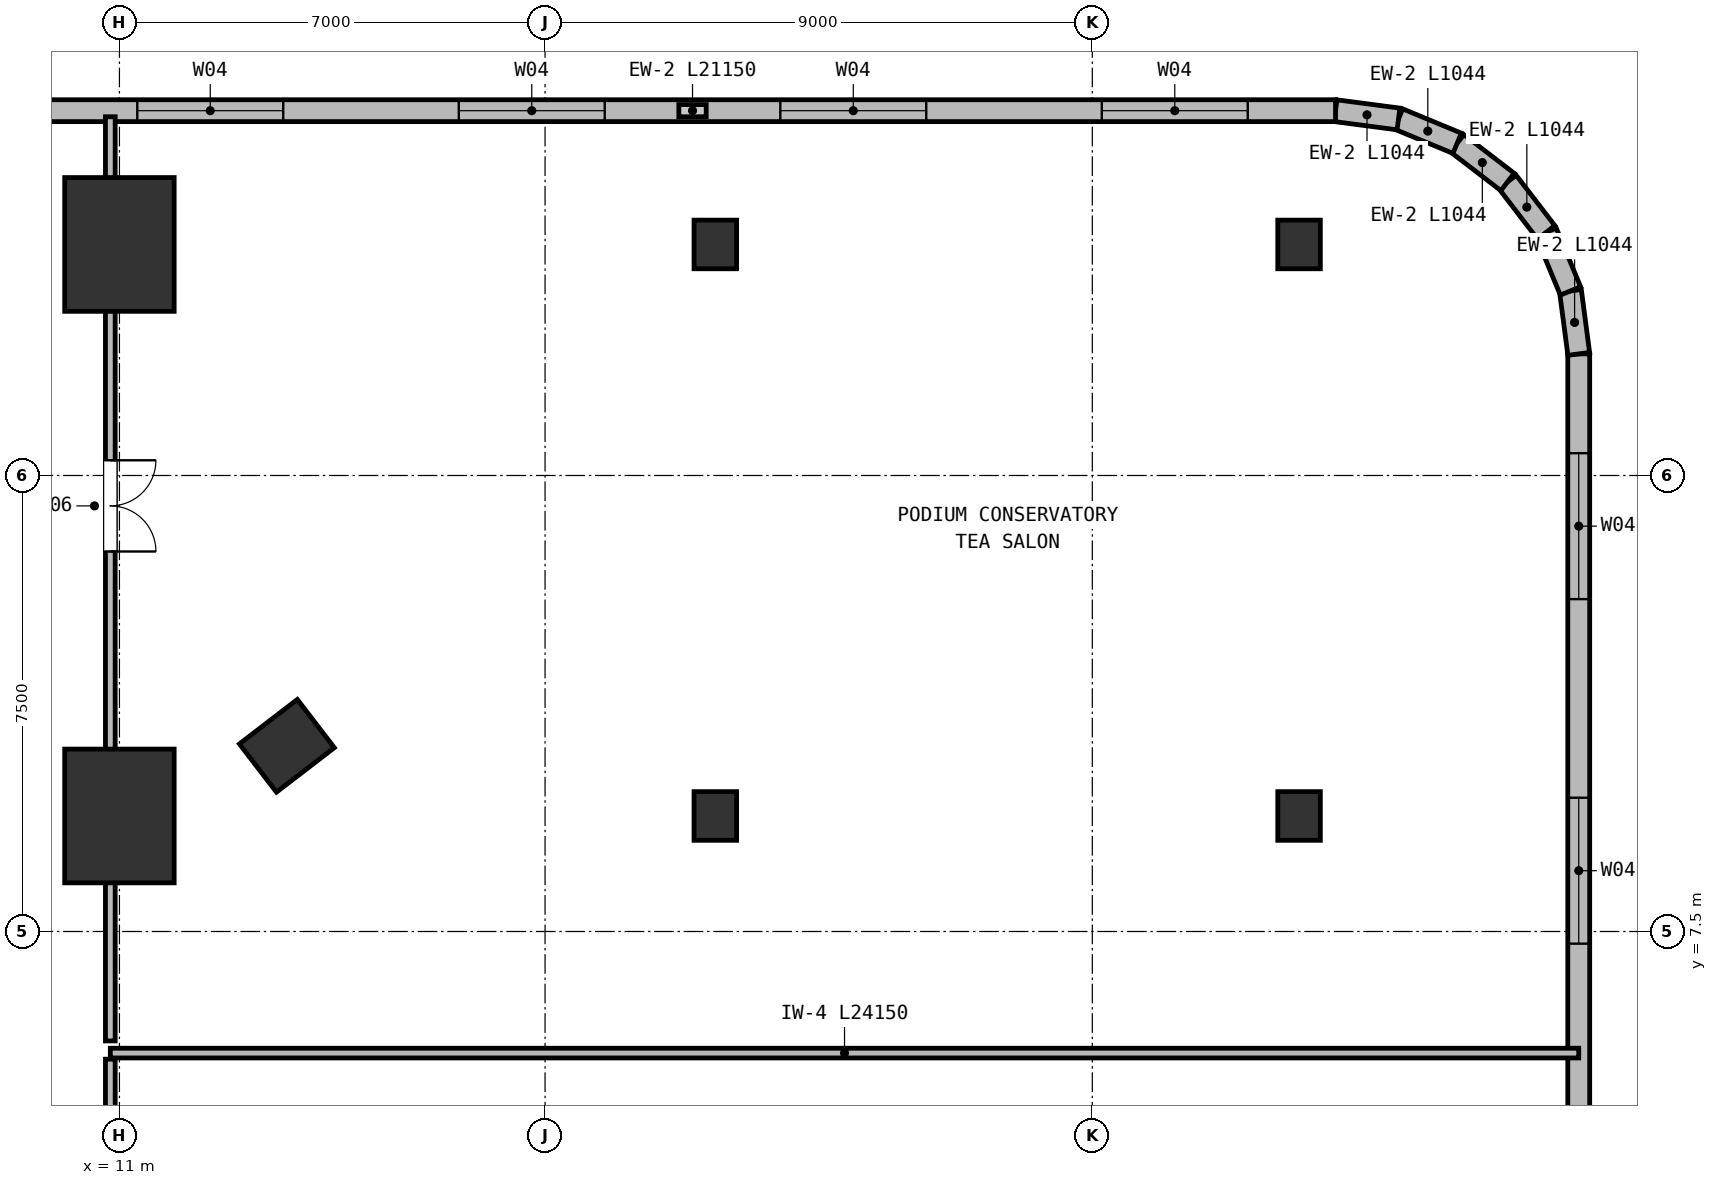
"""IFC4 building model, lengths in metres.
Left out: names, types, materials, properties, quantities, classifications, styles, units other than length and angle.
Written with IfcOpenShell. Run it as: python <this file> out.ifc"""

import sys

from ifc_helpers import new_model, si_unit, direction, frame, frame_2d, origin, origin_2d, place, context, subcontext, project, spatial, rectangle, extrude, element, fill, save


model = new_model("IFC4")
c1 = context("Model", 3, precision=1e-05, world=origin(), true_north=direction((0.0, 1.0)))
c2 = subcontext(c1, "Body", "Model", "MODEL_VIEW")
j1 = project(units=[si_unit("LENGTHUNIT", "METRE"), si_unit("PLANEANGLEUNIT", "RADIAN")], contexts=[c1])
p1 = place(None, origin())
s1 = spatial("IfcSite", under=j1, at=p1, CompositionType="ELEMENT")
p2 = place(p1, origin())
s2 = spatial("IfcBuilding", under=s1, at=p2, CompositionType="ELEMENT")
p3 = place(p2, frame((0.0, 0.0, 26.0)))
s3 = spatial("IfcBuildingStorey", under=s2, at=p3, CompositionType="ELEMENT", Elevation=26.0)
p4 = place(p3, frame((13.754, 10.554, 0.0), z_axis=(0.0, 0.0, 1.0), x_axis=(-0.608761429009, 0.793353340291, 0.0)))
e1 = element("IfcColumn", 1, at=p4, inside=s3, PredefinedType="COLUMN", context=c2, shape_type="SweptSolid", body=[
    extrude(rectangle(XDim=1.0, YDim=1.2, at=origin_2d()), origin(), (0.0, 0.0, 1.0), 4.5),
])
for number, where, z_axis, x_axis in (
    (2, (11.0, 9.4, 0.0), (0.0, 0.0, 1.0), (1.0, 0.0, 0.0)),
    (3, (11.0, 18.8, 0.0), (0.0, 0.0, 1.0), (1.0, 0.0, 0.0)),
):
    element("IfcColumn", number, at=place(p3, frame(where, z_axis=z_axis, x_axis=x_axis)), inside=s3, PredefinedType="COLUMN", context=c2, shape_type="SweptSolid", body=[
        extrude(rectangle(XDim=1.8, YDim=2.2, at=origin_2d()), origin(), (0.0, 0.0, 1.0), 4.5),
    ])
for number, where, z_axis, x_axis in (
    (4, (20.8, 9.4, 0.0), (0.0, 0.0, 1.0), (1.0, 0.0, 0.0)),
    (5, (20.8, 18.8, 0.0), (0.0, 0.0, 1.0), (1.0, 0.0, 0.0)),
    (6, (30.4, 9.4, 0.0), (0.0, 0.0, 1.0), (1.0, 0.0, 0.0)),
    (7, (30.4, 18.8, 0.0), (0.0, 0.0, 1.0), (1.0, 0.0, 0.0)),
):
    element("IfcColumn", number, at=place(p3, frame(where, z_axis=z_axis, x_axis=x_axis)), inside=s3, PredefinedType="COLUMN", context=c2, shape_type="SweptSolid", body=[
        extrude(rectangle(XDim=0.7, YDim=0.8, at=origin_2d()), origin(), (0.0, 0.0, 1.0), 4.5),
    ])
p5 = place(p3, frame((35.0, 17.0, 0.0), z_axis=(0.0, 0.0, 1.0), x_axis=(0.0, -1.0, 0.0)))
e8 = element("IfcWall", 8, at=p5, inside=s3, PredefinedType="SOLIDWALL", context=c2, shape_type="SweptSolid", body=[
    extrude(rectangle(XDim=34.0, YDim=0.36, at=frame_2d((17.0, 0.0))), origin(), (0.0, 0.0, 1.0), 4.25),
])
p6 = place(p5, frame((1.633, 0.0, 0.95)))
e9 = element("IfcOpeningElement", 9, at=p6, cuts=e8, PredefinedType="OPENING", context=c2, shape_type="SweptSolid", body=[
    extrude(rectangle(XDim=2.4, YDim=2.6, at=frame_2d((1.2, 1.3))), frame((0.0, 0.19, 0.0), z_axis=(0.0, -1.0, 0.0), x_axis=(1.0, 0.0, 0.0)), (0.0, 0.0, 1.0), 0.38),
])
p7 = place(p5, frame((7.3, 0.0, 0.95)))
e10 = element("IfcOpeningElement", 10, at=p7, cuts=e8, PredefinedType="OPENING", context=c2, shape_type="SweptSolid", body=[
    extrude(rectangle(XDim=2.4, YDim=2.6, at=frame_2d((1.2, 1.3))), frame((0.0, 0.19, 0.0), z_axis=(0.0, -1.0, 0.0), x_axis=(1.0, 0.0, 0.0)), (0.0, 0.0, 1.0), 0.38),
])
p8 = place(p5, frame((12.967, 0.0, 0.95)))
e11 = element("IfcOpeningElement", 11, at=p8, cuts=e8, PredefinedType="OPENING", context=c2, shape_type="SweptSolid", body=[
    extrude(rectangle(XDim=2.4, YDim=2.6, at=frame_2d((1.2, 1.3))), frame((0.0, 0.19, 0.0), z_axis=(0.0, -1.0, 0.0), x_axis=(1.0, 0.0, 0.0)), (0.0, 0.0, 1.0), 0.38),
])
p9 = place(p5, frame((18.633, 0.0, 0.95)))
e12 = element("IfcOpeningElement", 12, at=p9, cuts=e8, PredefinedType="OPENING", context=c2, shape_type="SweptSolid", body=[
    extrude(rectangle(XDim=2.4, YDim=2.6, at=frame_2d((1.2, 1.3))), frame((0.0, 0.19, 0.0), z_axis=(0.0, -1.0, 0.0), x_axis=(1.0, 0.0, 0.0)), (0.0, 0.0, 1.0), 0.38),
])
p10 = place(p5, frame((24.3, 0.0, 0.95)))
e13 = element("IfcOpeningElement", 13, at=p10, cuts=e8, PredefinedType="OPENING", context=c2, shape_type="SweptSolid", body=[
    extrude(rectangle(XDim=2.4, YDim=2.6, at=frame_2d((1.2, 1.3))), frame((0.0, 0.19, 0.0), z_axis=(0.0, -1.0, 0.0), x_axis=(1.0, 0.0, 0.0)), (0.0, 0.0, 1.0), 0.38),
])
p11 = place(p5, frame((29.967, 0.0, 0.95)))
e14 = element("IfcOpeningElement", 14, at=p11, cuts=e8, PredefinedType="OPENING", context=c2, shape_type="SweptSolid", body=[
    extrude(rectangle(XDim=2.4, YDim=2.6, at=frame_2d((1.2, 1.3))), frame((0.0, 0.19, 0.0), z_axis=(0.0, -1.0, 0.0), x_axis=(1.0, 0.0, 0.0)), (0.0, 0.0, 1.0), 0.38),
])
p12 = place(p3, frame((34.864, 18.035, 0.0), z_axis=(0.0, 0.0, 1.0), x_axis=(0.130448465198, -0.991455091231, 0.0)))
e15 = element("IfcWall", 15, at=p12, inside=s3, PredefinedType="SOLIDWALL", context=c2, shape_type="SweptSolid", body=[
    extrude(rectangle(XDim=1.044, YDim=0.36, at=frame_2d((0.522, 0.0))), origin(), (0.0, 0.0, 1.0), 4.25),
])
for number, where, z_axis, x_axis in (
    (16, (34.464, 19.0, 0.0), (0.0, 0.0, 1.0), (0.383, -0.924, 0.0)),
    (17, (33.828, 19.828, 0.0), (0.0, 0.0, 1.0), (0.609, -0.793, 0.0)),
    (18, (33.0, 20.464, 0.0), (0.0, 0.0, 1.0), (0.793, -0.609, 0.0)),
    (19, (32.035, 20.864, 0.0), (0.0, 0.0, 1.0), (0.924, -0.383, 0.0)),
):
    element("IfcWall", number, at=place(p3, frame(where, z_axis=z_axis, x_axis=x_axis)), inside=s3, PredefinedType="SOLIDWALL", context=c2, shape_type="SweptSolid", body=[
        extrude(rectangle(XDim=1.044, YDim=0.36, at=frame_2d((0.522, 0.0))), origin(), (0.0, 0.0, 1.0), 4.25),
    ])
p13 = place(p3, frame((31.0, 21.0, 0.0), z_axis=(0.0, 0.0, 1.0), x_axis=(0.991455091231, -0.130448465198, 0.0)))
e20 = element("IfcWall", 20, at=p13, inside=s3, PredefinedType="SOLIDWALL", context=c2, shape_type="SweptSolid", body=[
    extrude(rectangle(XDim=1.044, YDim=0.36, at=frame_2d((0.522, 0.0))), origin(), (0.0, 0.0, 1.0), 4.25),
])
p14 = place(p3, frame((9.85, 21.0, 0.0), z_axis=(0.0, 0.0, 1.0), x_axis=(1.0, 0.0, 0.0)))
e21 = element("IfcWall", 21, at=p14, inside=s3, PredefinedType="SOLIDWALL", context=c2, shape_type="SweptSolid", body=[
    extrude(rectangle(XDim=21.15, YDim=0.36, at=frame_2d((10.575, 0.0))), origin(), (0.0, 0.0, 1.0), 4.25),
])
p15 = place(p14, frame((1.444, 0.0, 0.95)))
e22 = element("IfcOpeningElement", 22, at=p15, cuts=e21, PredefinedType="OPENING", context=c2, shape_type="SweptSolid", body=[
    extrude(rectangle(XDim=2.4, YDim=2.6, at=frame_2d((1.2, 1.3))), frame((0.0, 0.19, 0.0), z_axis=(0.0, -1.0, 0.0), x_axis=(1.0, 0.0, 0.0)), (0.0, 0.0, 1.0), 0.38),
])
p16 = place(p14, frame((6.731, 0.0, 0.95)))
e23 = element("IfcOpeningElement", 23, at=p16, cuts=e21, PredefinedType="OPENING", context=c2, shape_type="SweptSolid", body=[
    extrude(rectangle(XDim=2.4, YDim=2.6, at=frame_2d((1.2, 1.3))), frame((0.0, 0.19, 0.0), z_axis=(0.0, -1.0, 0.0), x_axis=(1.0, 0.0, 0.0)), (0.0, 0.0, 1.0), 0.38),
])
p17 = place(p14, frame((12.019, 0.0, 0.95)))
e24 = element("IfcOpeningElement", 24, at=p17, cuts=e21, PredefinedType="OPENING", context=c2, shape_type="SweptSolid", body=[
    extrude(rectangle(XDim=2.4, YDim=2.6, at=frame_2d((1.2, 1.3))), frame((0.0, 0.19, 0.0), z_axis=(0.0, -1.0, 0.0), x_axis=(1.0, 0.0, 0.0)), (0.0, 0.0, 1.0), 0.38),
])
p18 = place(p14, frame((17.306, 0.0, 0.95)))
e25 = element("IfcOpeningElement", 25, at=p18, cuts=e21, PredefinedType="OPENING", context=c2, shape_type="SweptSolid", body=[
    extrude(rectangle(XDim=2.4, YDim=2.6, at=frame_2d((1.2, 1.3))), frame((0.0, 0.19, 0.0), z_axis=(0.0, -1.0, 0.0), x_axis=(1.0, 0.0, 0.0)), (0.0, 0.0, 1.0), 0.38),
])
p19 = place(p3, frame((35.0, 5.5, 0.0), z_axis=(0.0, 0.0, 1.0), x_axis=(-1.0, 0.0, 0.0)))
e26 = element("IfcWall", 26, at=p19, inside=s3, PredefinedType="PARTITIONING", context=c2, shape_type="SweptSolid", body=[
    extrude(rectangle(XDim=24.15, YDim=0.16, at=frame_2d((12.075, 0.0))), origin(), (0.0, 0.0, 1.0), 3.32),
])
p20 = place(p3, frame((10.85, 5.4, 0.0), z_axis=(0.0, 0.0, 1.0), x_axis=(0.0, -1.0, 0.0)))
e27 = element("IfcWall", 27, at=p20, inside=s3, PredefinedType="PARTITIONING", context=c2, shape_type="SweptSolid", body=[
    extrude(rectangle(XDim=11.18, YDim=0.16, at=frame_2d((5.59, 0.0))), origin(), (0.0, 0.0, 1.0), 3.63),
])
p21 = place(p20, frame((7.06, 0.0, 0.0)))
e28 = element("IfcOpeningElement", 28, at=p21, cuts=e27, PredefinedType="OPENING", context=c2, shape_type="SweptSolid", body=[
    extrude(rectangle(XDim=1.5, YDim=2.2, at=frame_2d((0.75, 1.1))), frame((0.0, 0.09, 0.0), z_axis=(0.0, -1.0, 0.0), x_axis=(1.0, 0.0, 0.0)), (0.0, 0.0, 1.0), 0.18),
])
p22 = place(p3, frame((10.85, 20.9, 0.0), z_axis=(0.0, 0.0, 1.0), x_axis=(0.0, -1.0, 0.0)))
e29 = element("IfcWall", 29, at=p22, inside=s3, PredefinedType="PARTITIONING", context=c2, shape_type="SweptSolid", body=[
    extrude(rectangle(XDim=15.2, YDim=0.16, at=frame_2d((7.6, 0.0))), origin(), (0.0, 0.0, 1.0), 3.62),
])
p23 = place(p22, frame((5.65, 0.0, 0.0)))
e30 = element("IfcOpeningElement", 30, at=p23, cuts=e29, PredefinedType="OPENING", context=c2, shape_type="SweptSolid", body=[
    extrude(rectangle(XDim=1.5, YDim=2.2, at=frame_2d((0.75, 1.1))), frame((0.0, 0.09, 0.0), z_axis=(0.0, -1.0, 0.0), x_axis=(1.0, 0.0, 0.0)), (0.0, 0.0, 1.0), 0.18),
])
p24 = place(p6, origin())
e31 = element("IfcWindow", 31, at=p24, inside=s3, PartitioningType="SINGLE_PANEL", PredefinedType="WINDOW", context=c2, shape_type="SweptSolid", body=[
    extrude(rectangle(XDim=2.4, YDim=2.6, at=frame_2d((1.2, 1.3))), frame((0.0, 0.03, 0.0), z_axis=(0.0, -1.0, 0.0), x_axis=(1.0, 0.0, 0.0)), (0.0, 0.0, 1.0), 0.06),
])
fill(e9, e31)
p25 = place(p7, origin())
e32 = element("IfcWindow", 32, at=p25, inside=s3, PartitioningType="SINGLE_PANEL", PredefinedType="WINDOW", context=c2, shape_type="SweptSolid", body=[
    extrude(rectangle(XDim=2.4, YDim=2.6, at=frame_2d((1.2, 1.3))), frame((0.0, 0.03, 0.0), z_axis=(0.0, -1.0, 0.0), x_axis=(1.0, 0.0, 0.0)), (0.0, 0.0, 1.0), 0.06),
])
fill(e10, e32)
p26 = place(p15, origin())
e33 = element("IfcWindow", 33, at=p26, inside=s3, PartitioningType="SINGLE_PANEL", PredefinedType="WINDOW", context=c2, shape_type="SweptSolid", body=[
    extrude(rectangle(XDim=2.4, YDim=2.6, at=frame_2d((1.2, 1.3))), frame((0.0, 0.03, 0.0), z_axis=(0.0, -1.0, 0.0), x_axis=(1.0, 0.0, 0.0)), (0.0, 0.0, 1.0), 0.06),
])
fill(e22, e33)
p27 = place(p16, origin())
e34 = element("IfcWindow", 34, at=p27, inside=s3, PartitioningType="SINGLE_PANEL", PredefinedType="WINDOW", context=c2, shape_type="SweptSolid", body=[
    extrude(rectangle(XDim=2.4, YDim=2.6, at=frame_2d((1.2, 1.3))), frame((0.0, 0.03, 0.0), z_axis=(0.0, -1.0, 0.0), x_axis=(1.0, 0.0, 0.0)), (0.0, 0.0, 1.0), 0.06),
])
fill(e23, e34)
p28 = place(p17, origin())
e35 = element("IfcWindow", 35, at=p28, inside=s3, PartitioningType="SINGLE_PANEL", PredefinedType="WINDOW", context=c2, shape_type="SweptSolid", body=[
    extrude(rectangle(XDim=2.4, YDim=2.6, at=frame_2d((1.2, 1.3))), frame((0.0, 0.03, 0.0), z_axis=(0.0, -1.0, 0.0), x_axis=(1.0, 0.0, 0.0)), (0.0, 0.0, 1.0), 0.06),
])
fill(e24, e35)
p29 = place(p18, origin())
e36 = element("IfcWindow", 36, at=p29, inside=s3, PartitioningType="SINGLE_PANEL", PredefinedType="WINDOW", context=c2, shape_type="SweptSolid", body=[
    extrude(rectangle(XDim=2.4, YDim=2.6, at=frame_2d((1.2, 1.3))), frame((0.0, 0.03, 0.0), z_axis=(0.0, -1.0, 0.0), x_axis=(1.0, 0.0, 0.0)), (0.0, 0.0, 1.0), 0.06),
])
fill(e25, e36)
p30 = place(p23, origin())
e37 = element("IfcDoor", 37, at=p30, inside=s3, OperationType="DOUBLE_DOOR_SINGLE_SWING", PredefinedType="DOOR", context=c2, shape_type="SweptSolid", body=[
    extrude(rectangle(XDim=1.5, YDim=2.2, at=frame_2d((0.75, 1.1))), frame((0.0, 0.025, 0.0), z_axis=(0.0, -1.0, 0.0), x_axis=(1.0, 0.0, 0.0)), (0.0, 0.0, 1.0), 0.05),
])
fill(e30, e37)
save(model, sys.argv[1])
